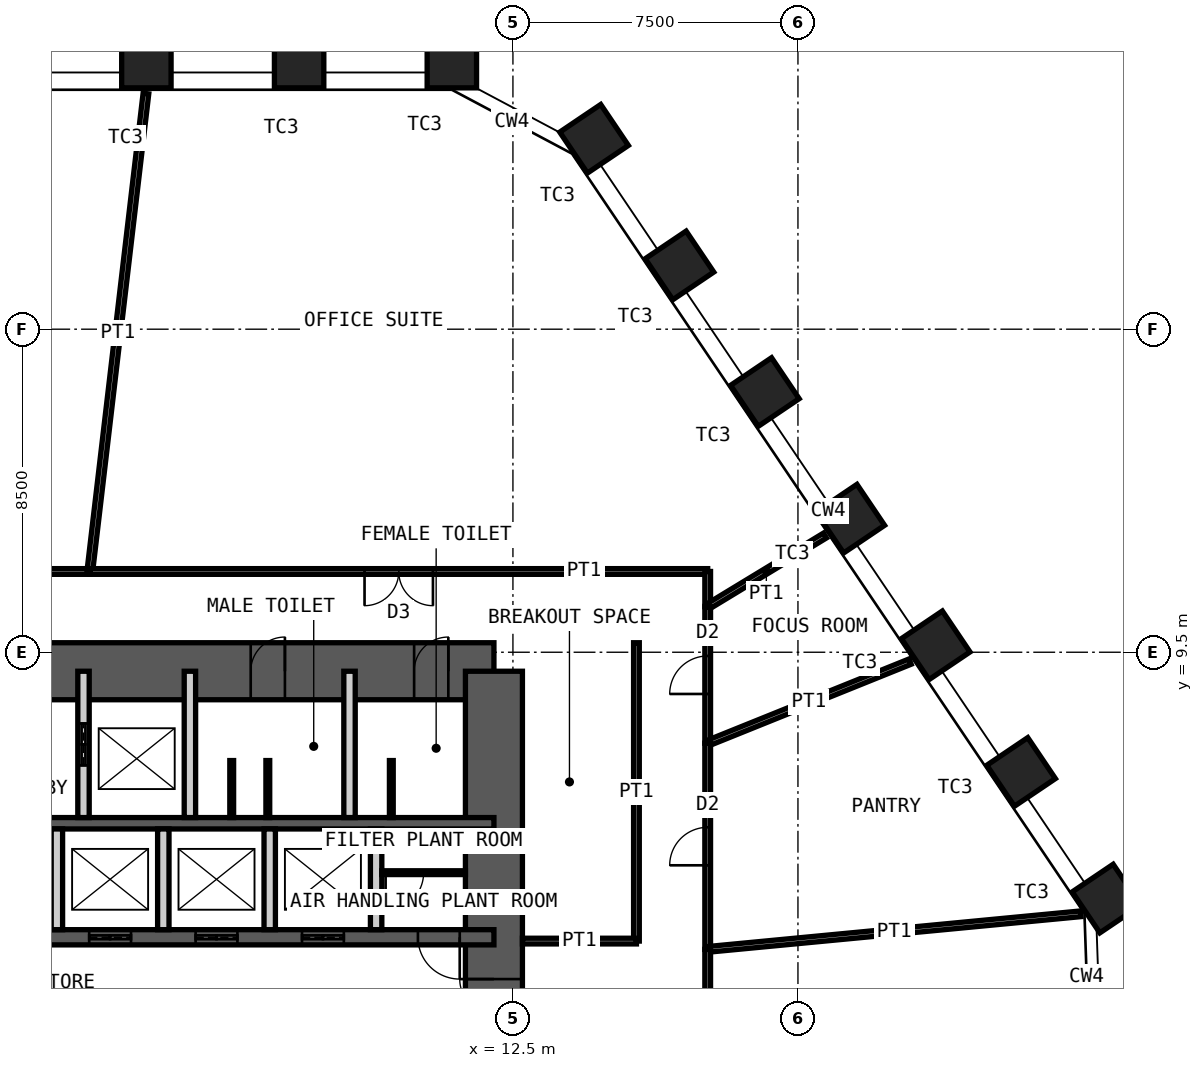
"""IFC4 building model, lengths in metres.
Left out: names, types, materials, properties, quantities, classifications, styles, units other than length and angle.
Written with IfcOpenShell. Run it as: python <this file> out.ifc"""

import sys

from ifc_helpers import new_model, si_unit, direction, frame, frame_2d, origin, origin_2d, place, context, subcontext, project, spatial, rectangle, hollow_rectangle, extrude, element, fill, save


model = new_model("IFC4")
c1 = context("Model", 3, precision=1e-05, world=origin(), true_north=direction((0.0, 1.0)))
c2 = subcontext(c1, "Body", "Model", "MODEL_VIEW")
j1 = project(units=[si_unit("LENGTHUNIT", "METRE"), si_unit("PLANEANGLEUNIT", "RADIAN")], contexts=[c1])
p1 = place(None, origin())
s1 = spatial("IfcSite", under=j1, at=p1, CompositionType="ELEMENT")
p2 = place(p1, origin())
s2 = spatial("IfcBuilding", under=s1, at=p2, CompositionType="ELEMENT")
p3 = place(p2, frame((0.0, 0.0, 128.2)))
s3 = spatial("IfcBuildingStorey", under=s2, at=p3, CompositionType="ELEMENT", Elevation=128.2)
for number, where, z_axis, x_axis in (
    (1, (2.854, 25.0, 0.0), (0.0, 0.0, 1.0), (-1.0, 0.0, 0.0)),
    (2, (6.874, 25.0, 0.0), (0.0, 0.0, 1.0), (-1.0, 0.0, 0.0)),
    (3, (10.893, 25.0, 0.0), (0.0, 0.0, 1.0), (-1.0, 0.0, 0.0)),
    (4, (14.635, 23.01, 0.0), (0.0, 0.0, 1.0), (-0.559, 0.829, 0.0)),
    (5, (16.882, 19.678, 0.0), (0.0, 0.0, 1.0), (-0.559, 0.829, 0.0)),
    (6, (19.13, 16.346, 0.0), (0.0, 0.0, 1.0), (-0.559, 0.829, 0.0)),
    (7, (21.377, 13.014, 0.0), (0.0, 0.0, 1.0), (-0.559, 0.829, 0.0)),
    (8, (23.625, 9.682, 0.0), (0.0, 0.0, 1.0), (-0.559, 0.829, 0.0)),
    (9, (25.872, 6.351, 0.0), (0.0, 0.0, 1.0), (-0.559, 0.829, 0.0)),
    (10, (28.119, 3.019, 0.0), (0.0, 0.0, 1.0), (-0.559, 0.829, 0.0)),
):
    element("IfcColumn", number, at=place(p3, frame(where, z_axis=z_axis, x_axis=x_axis)), inside=s3, PredefinedType="COLUMN", context=c2, shape_type="SweptSolid", body=[
        extrude(hollow_rectangle(XDim=1.3, YDim=1.3, WallThickness=0.1, at=origin_2d()), origin(), (0.0, 0.0, 1.0), 4.2),
    ])
p4 = place(p3, frame((-12.0, 9.0, 0.0), z_axis=(0.0, 0.0, 1.0), x_axis=(1.0, 0.0, 0.0)))
e11 = element("IfcWall", 11, at=p4, inside=s3, PredefinedType="SHEAR", context=c2, shape_type="SweptSolid", body=[
    extrude(rectangle(XDim=24.0, YDim=1.5, at=frame_2d((12.0, 0.0))), origin(), (0.0, 0.0, 1.0), 4.2),
])
p5 = place(p4, frame((10.4, 0.0, 0.0)))
e12 = element("IfcOpeningElement", 12, at=p5, cuts=e11, PredefinedType="OPENING", context=c2, shape_type="SweptSolid", body=[
    extrude(rectangle(XDim=1.0, YDim=2.1, at=frame_2d((0.5, 1.05))), frame((0.0, 0.76, 0.0), z_axis=(0.0, -1.0, 0.0), x_axis=(1.0, 0.0, 0.0)), (0.0, 0.0, 1.0), 1.52),
])
p6 = place(p4, frame((17.6, 0.0, 0.0)))
e13 = element("IfcOpeningElement", 13, at=p6, cuts=e11, PredefinedType="OPENING", context=c2, shape_type="SweptSolid", body=[
    extrude(rectangle(XDim=0.9, YDim=2.1, at=frame_2d((0.45, 1.05))), frame((0.0, 0.76, 0.0), z_axis=(0.0, -1.0, 0.0), x_axis=(1.0, 0.0, 0.0)), (0.0, 0.0, 1.0), 1.52),
])
p7 = place(p4, frame((21.9, 0.0, 0.0)))
e14 = element("IfcOpeningElement", 14, at=p7, cuts=e11, PredefinedType="OPENING", context=c2, shape_type="SweptSolid", body=[
    extrude(rectangle(XDim=0.9, YDim=2.1, at=frame_2d((0.45, 1.05))), frame((0.0, 0.76, 0.0), z_axis=(0.0, -1.0, 0.0), x_axis=(1.0, 0.0, 0.0)), (0.0, 0.0, 1.0), 1.52),
])
p8 = place(p3, frame((12.0, -9.0, 0.0), z_axis=(0.0, 0.0, 1.0), x_axis=(0.0, 1.0, 0.0)))
e15 = element("IfcWall", 15, at=p8, inside=s3, PredefinedType="SHEAR", context=c2, shape_type="SweptSolid", body=[
    extrude(rectangle(XDim=18.0, YDim=1.5, at=frame_2d((9.0, 0.0))), origin(), (0.0, 0.0, 1.0), 4.2),
])
p9 = place(p8, frame((8.1, 0.0, 0.0)))
e16 = element("IfcOpeningElement", 16, at=p9, cuts=e15, PredefinedType="OPENING", context=c2, shape_type="SweptSolid", body=[
    extrude(rectangle(XDim=1.8, YDim=2.1, at=frame_2d((0.9, 1.05))), frame((0.0, 0.76, 0.0), z_axis=(0.0, -1.0, 0.0), x_axis=(1.0, 0.0, 0.0)), (0.0, 0.0, 1.0), 1.52),
])
p10 = place(p3, frame((-12.0, 5.0, 0.0), z_axis=(0.0, 0.0, 1.0), x_axis=(1.0, 0.0, 0.0)))
e17 = element("IfcWall", 17, at=p10, inside=s3, PredefinedType="SHEAR", context=c2, shape_type="SweptSolid", body=[
    extrude(rectangle(XDim=24.0, YDim=0.3, at=frame_2d((12.0, 0.0))), origin(), (0.0, 0.0, 1.0), 4.2),
])
p11 = place(p3, frame((-12.0, 2.0, 0.0), z_axis=(0.0, 0.0, 1.0), x_axis=(1.0, 0.0, 0.0)))
e18 = element("IfcWall", 18, at=p11, inside=s3, PredefinedType="SHEAR", context=c2, shape_type="SweptSolid", body=[
    extrude(rectangle(XDim=24.0, YDim=0.4, at=frame_2d((12.0, 0.0))), origin(), (0.0, 0.0, 1.0), 4.2),
])
p12 = place(p11, frame((2.4, 0.0, 0.0)))
e19 = element("IfcOpeningElement", 19, at=p12, cuts=e18, PredefinedType="OPENING", context=c2, shape_type="SweptSolid", body=[
    extrude(rectangle(XDim=1.1, YDim=2.1, at=frame_2d((0.55, 1.05))), frame((0.0, 0.21, 0.0), z_axis=(0.0, -1.0, 0.0), x_axis=(1.0, 0.0, 0.0)), (0.0, 0.0, 1.0), 0.42),
])
p13 = place(p11, frame((22.0, 0.0, 0.0)))
e20 = element("IfcOpeningElement", 20, at=p13, cuts=e18, PredefinedType="OPENING", context=c2, shape_type="SweptSolid", body=[
    extrude(rectangle(XDim=1.1, YDim=2.1, at=frame_2d((0.55, 1.05))), frame((0.0, 0.21, 0.0), z_axis=(0.0, -1.0, 0.0), x_axis=(1.0, 0.0, 0.0)), (0.0, 0.0, 1.0), 0.42),
])
p14 = place(p11, frame((10.15, 0.0, 0.0)))
e21 = element("IfcOpeningElement", 21, at=p14, cuts=e18, PredefinedType="OPENING", context=c2, shape_type="SweptSolid", body=[
    extrude(rectangle(XDim=1.0, YDim=2.1, at=frame_2d((0.5, 1.05))), frame((0.0, 0.21, 0.0), z_axis=(0.0, -1.0, 0.0), x_axis=(1.0, 0.0, 0.0)), (0.0, 0.0, 1.0), 0.42),
])
p15 = place(p11, frame((6.9, 0.0, 0.0)))
e22 = element("IfcOpeningElement", 22, at=p15, cuts=e18, PredefinedType="OPENING", context=c2, shape_type="SweptSolid", body=[
    extrude(rectangle(XDim=1.0, YDim=2.1, at=frame_2d((0.5, 1.05))), frame((0.0, 0.21, 0.0), z_axis=(0.0, -1.0, 0.0), x_axis=(1.0, 0.0, 0.0)), (0.0, 0.0, 1.0), 0.42),
])
p16 = place(p11, frame((13.35, 0.0, 0.0)))
e23 = element("IfcOpeningElement", 23, at=p16, cuts=e18, PredefinedType="OPENING", context=c2, shape_type="SweptSolid", body=[
    extrude(rectangle(XDim=1.1, YDim=2.4, at=frame_2d((0.55, 1.2))), frame((0.0, 0.21, 0.0), z_axis=(0.0, -1.0, 0.0), x_axis=(1.0, 0.0, 0.0)), (0.0, 0.0, 1.0), 0.42),
])
p17 = place(p11, frame((16.15, 0.0, 0.0)))
e24 = element("IfcOpeningElement", 24, at=p17, cuts=e18, PredefinedType="OPENING", context=c2, shape_type="SweptSolid", body=[
    extrude(rectangle(XDim=1.1, YDim=2.4, at=frame_2d((0.55, 1.2))), frame((0.0, 0.21, 0.0), z_axis=(0.0, -1.0, 0.0), x_axis=(1.0, 0.0, 0.0)), (0.0, 0.0, 1.0), 0.42),
])
p18 = place(p11, frame((18.95, 0.0, 0.0)))
e25 = element("IfcOpeningElement", 25, at=p18, cuts=e18, PredefinedType="OPENING", context=c2, shape_type="SweptSolid", body=[
    extrude(rectangle(XDim=1.1, YDim=2.4, at=frame_2d((0.55, 1.2))), frame((0.0, 0.21, 0.0), z_axis=(0.0, -1.0, 0.0), x_axis=(1.0, 0.0, 0.0)), (0.0, 0.0, 1.0), 0.42),
])
p19 = place(p3, frame((1.2, 5.15, 0.0), z_axis=(0.0, 0.0, 1.0), x_axis=(0.0, 1.0, 0.0)))
e26 = element("IfcWall", 26, at=p19, inside=s3, PredefinedType="PARTITIONING", context=c2, shape_type="SweptSolid", body=[
    extrude(rectangle(XDim=3.85, YDim=0.3, at=frame_2d((1.925, 0.0))), origin(), (0.0, 0.0, 1.0), 3.98),
])
p20 = place(p19, frame((1.375, 0.0, 0.0)))
e27 = element("IfcOpeningElement", 27, at=p20, cuts=e26, PredefinedType="OPENING", context=c2, shape_type="SweptSolid", body=[
    extrude(rectangle(XDim=1.1, YDim=2.4, at=frame_2d((0.55, 1.2))), frame((0.0, 0.16, 0.0), z_axis=(0.0, -1.0, 0.0), x_axis=(1.0, 0.0, 0.0)), (0.0, 0.0, 1.0), 0.32),
])
for number, where, z_axis, x_axis in (
    (28, (4.0, 5.15, 0.0), (0.0, 0.0, 1.0), (0.0, 1.0, 0.0)),
    (29, (8.2, 5.15, 0.0), (0.0, 0.0, 1.0), (0.0, 1.0, 0.0)),
):
    element("IfcWall", number, at=place(p3, frame(where, z_axis=z_axis, x_axis=x_axis)), inside=s3, PredefinedType="PARTITIONING", context=c2, shape_type="SweptSolid", body=[
        extrude(rectangle(XDim=3.85, YDim=0.3, at=frame_2d((1.925, 0.0))), origin(), (0.0, 0.0, 1.0), 3.98),
    ])
for number, where, z_axis, x_axis in (
    (30, (0.5, 2.2, 0.0), (0.0, 0.0, 1.0), (0.0, 1.0, 0.0)),
    (31, (3.3, 2.2, 0.0), (0.0, 0.0, 1.0), (0.0, 1.0, 0.0)),
    (32, (6.1, 2.2, 0.0), (0.0, 0.0, 1.0), (0.0, 1.0, 0.0)),
    (33, (8.9, 2.2, 0.0), (0.0, 0.0, 1.0), (0.0, 1.0, 0.0)),
):
    element("IfcWall", number, at=place(p3, frame(where, z_axis=z_axis, x_axis=x_axis)), inside=s3, PredefinedType="PARTITIONING", context=c2, shape_type="SweptSolid", body=[
        extrude(rectangle(XDim=2.65, YDim=0.3, at=frame_2d((1.325, 0.0))), origin(), (0.0, 0.0, 1.0), 3.98),
    ])
p21 = place(p3, frame((9.05, 3.7, 0.0), z_axis=(0.0, 0.0, 1.0), x_axis=(1.0, 0.0, 0.0)))
e34 = element("IfcWall", 34, at=p21, inside=s3, PredefinedType="PARTITIONING", context=c2, shape_type="SweptSolid", body=[
    extrude(rectangle(XDim=2.2, YDim=0.1, at=frame_2d((1.1, 0.0))), origin(), (0.0, 0.0, 1.0), 3.98),
])
p22 = place(p21, frame((0.1, 0.0, 0.0)))
e35 = element("IfcOpeningElement", 35, at=p22, cuts=e34, PredefinedType="OPENING", context=c2, shape_type="SweptSolid", body=[
    extrude(rectangle(XDim=1.0, YDim=2.4, at=frame_2d((0.5, 1.2))), frame((0.0, 0.06, 0.0), z_axis=(0.0, -1.0, 0.0), x_axis=(1.0, 0.0, 0.0)), (0.0, 0.0, 1.0), 0.12),
])
for number, where, z_axis, x_axis in (
    (36, (5.1, 5.15, 0.0), (0.0, 0.0, 1.0), (0.0, 1.0, 0.0)),
    (37, (6.05, 5.15, 0.0), (0.0, 0.0, 1.0), (0.0, 1.0, 0.0)),
    (38, (9.3, 5.15, 0.0), (0.0, 0.0, 1.0), (0.0, 1.0, 0.0)),
):
    element("IfcWall", number, at=place(p3, frame(where, z_axis=z_axis, x_axis=x_axis)), inside=s3, PredefinedType="PARTITIONING", context=c2, shape_type="SweptSolid", body=[
        extrude(rectangle(XDim=1.5, YDim=0.1, at=frame_2d((0.75, 0.0))), origin(), (0.0, 0.0, 1.0), 2.1),
    ])
p23 = place(p3, frame((-8.277, 11.625, 0.0), z_axis=(0.0, 0.0, 1.0), x_axis=(1.0, 0.0, 0.0)))
e39 = element("IfcWall", 39, at=p23, inside=s3, PredefinedType="PARTITIONING", context=c2, shape_type="SweptSolid", body=[
    extrude(rectangle(XDim=9.642, YDim=0.15, at=frame_2d((4.821, 0.0))), origin(), (0.0, 0.0, 1.0), 4.03),
])
p24 = place(p23, frame((3.921, 0.0, 0.0)))
e40 = element("IfcOpeningElement", 40, at=p24, cuts=e39, PredefinedType="OPENING", context=c2, shape_type="SweptSolid", body=[
    extrude(rectangle(XDim=1.8, YDim=2.4, at=frame_2d((0.9, 1.2))), frame((0.0, 0.085, 0.0), z_axis=(0.0, -1.0, 0.0), x_axis=(1.0, 0.0, 0.0)), (0.0, 0.0, 1.0), 0.17),
])
p25 = place(p3, frame((2.843, 24.201, 0.0), z_axis=(0.0, 0.0, 1.0), x_axis=(-0.116670084723, -0.993170726175, 0.0)))
e41 = element("IfcWall", 41, at=p25, inside=s3, PredefinedType="PARTITIONING", context=c2, shape_type="SweptSolid", body=[
    extrude(rectangle(XDim=12.662, YDim=0.15, at=frame_2d((6.331, 0.0))), origin(), (0.0, 0.0, 1.0), 3.33),
])
p26 = place(p3, frame((1.366, 11.625, 0.0), z_axis=(0.0, 0.0, 1.0), x_axis=(1.0, 0.0, 0.0)))
e42 = element("IfcWall", 42, at=p26, inside=s3, PredefinedType="PARTITIONING", context=c2, shape_type="SweptSolid", body=[
    extrude(rectangle(XDim=16.259, YDim=0.15, at=frame_2d((8.13, 0.0))), origin(), (0.0, 0.0, 1.0), 4.03),
])
p27 = place(p26, frame((7.23, 0.0, 0.0)))
e43 = element("IfcOpeningElement", 43, at=p27, cuts=e42, PredefinedType="OPENING", context=c2, shape_type="SweptSolid", body=[
    extrude(rectangle(XDim=1.8, YDim=2.4, at=frame_2d((0.9, 1.2))), frame((0.0, 0.085, 0.0), z_axis=(0.0, -1.0, 0.0), x_axis=(1.0, 0.0, 0.0)), (0.0, 0.0, 1.0), 0.17),
])
p28 = place(p3, frame((17.625, 11.625, 0.0), z_axis=(0.0, 0.0, 1.0), x_axis=(0.0, -1.0, 0.0)))
e44 = element("IfcWall", 44, at=p28, inside=s3, PredefinedType="PARTITIONING", context=c2, shape_type="SweptSolid", body=[
    extrude(rectangle(XDim=0.927, YDim=0.15, at=frame_2d((0.464, 0.0))), origin(), (0.0, 0.0, 1.0), 4.03),
])
p29 = place(p3, frame((20.711, 12.571, 0.0), z_axis=(0.0, 0.0, 1.0), x_axis=(-0.854862500505, -0.518854608952, 0.0)))
e45 = element("IfcWall", 45, at=p29, inside=s3, PredefinedType="PARTITIONING", context=c2, shape_type="SweptSolid", body=[
    extrude(rectangle(XDim=3.61, YDim=0.15, at=frame_2d((1.805, 0.0))), origin(), (0.0, 0.0, 1.0), 3.33),
])
p30 = place(p3, frame((17.625, 10.698, 0.0), z_axis=(0.0, 0.0, 1.0), x_axis=(0.0, -1.0, 0.0)))
e46 = element("IfcWall", 46, at=p30, inside=s3, PredefinedType="PARTITIONING", context=c2, shape_type="SweptSolid", body=[
    extrude(rectangle(XDim=3.592, YDim=0.15, at=frame_2d((1.796, 0.0))), origin(), (0.0, 0.0, 1.0), 4.03),
])
p31 = place(p30, frame((1.296, 0.0, 0.0)))
e47 = element("IfcOpeningElement", 47, at=p31, cuts=e46, PredefinedType="OPENING", context=c2, shape_type="SweptSolid", body=[
    extrude(rectangle(XDim=1.0, YDim=2.4, at=frame_2d((0.5, 1.2))), frame((0.0, 0.085, 0.0), z_axis=(0.0, -1.0, 0.0), x_axis=(1.0, 0.0, 0.0)), (0.0, 0.0, 1.0), 0.17),
])
p32 = place(p3, frame((22.951, 9.254, 0.0), z_axis=(0.0, 0.0, 1.0), x_axis=(-0.927444087873, -0.373961848147, 0.0)))
e48 = element("IfcWall", 48, at=p32, inside=s3, PredefinedType="PARTITIONING", context=c2, shape_type="SweptSolid", body=[
    extrude(rectangle(XDim=5.743, YDim=0.15, at=frame_2d((2.872, 0.0))), origin(), (0.0, 0.0, 1.0), 3.33),
])
p33 = place(p3, frame((17.625, 7.106, 0.0), z_axis=(0.0, 0.0, 1.0), x_axis=(0.0, -1.0, 0.0)))
e49 = element("IfcWall", 49, at=p33, inside=s3, PredefinedType="PARTITIONING", context=c2, shape_type="SweptSolid", body=[
    extrude(rectangle(XDim=5.425, YDim=0.15, at=frame_2d((2.712, 0.0))), origin(), (0.0, 0.0, 1.0), 4.03),
])
p34 = place(p33, frame((2.212, 0.0, 0.0)))
e50 = element("IfcOpeningElement", 50, at=p34, cuts=e49, PredefinedType="OPENING", context=c2, shape_type="SweptSolid", body=[
    extrude(rectangle(XDim=1.0, YDim=2.4, at=frame_2d((0.5, 1.2))), frame((0.0, 0.085, 0.0), z_axis=(0.0, -1.0, 0.0), x_axis=(1.0, 0.0, 0.0)), (0.0, 0.0, 1.0), 0.17),
])
p35 = place(p3, frame((27.439, 2.618, 0.0), z_axis=(0.0, 0.0, 1.0), x_axis=(-0.995480435234, -0.094966852466, 0.0)))
e51 = element("IfcWall", 51, at=p35, inside=s3, PredefinedType="PARTITIONING", context=c2, shape_type="SweptSolid", body=[
    extrude(rectangle(XDim=9.859, YDim=0.15, at=frame_2d((4.93, 0.0))), origin(), (0.0, 0.0, 1.0), 2.93),
])
p36 = place(p3, frame((17.625, 1.681, 0.0), z_axis=(0.0, 0.0, 1.0), x_axis=(0.0, -1.0, 0.0)))
e52 = element("IfcWall", 52, at=p36, inside=s3, PredefinedType="PARTITIONING", context=c2, shape_type="SweptSolid", body=[
    extrude(rectangle(XDim=7.394, YDim=0.15, at=frame_2d((3.697, 0.0))), origin(), (0.0, 0.0, 1.0), 4.03),
])
p37 = place(p36, frame((3.197, 0.0, 0.0)))
e53 = element("IfcOpeningElement", 53, at=p37, cuts=e52, PredefinedType="OPENING", context=c2, shape_type="SweptSolid", body=[
    extrude(rectangle(XDim=1.0, YDim=2.4, at=frame_2d((0.5, 1.2))), frame((0.0, 0.085, 0.0), z_axis=(0.0, -1.0, 0.0), x_axis=(1.0, 0.0, 0.0)), (0.0, 0.0, 1.0), 0.17),
])
p38 = place(p3, frame((15.75, 1.9, 0.0), z_axis=(0.0, 0.0, 1.0), x_axis=(0.0, 1.0, 0.0)))
e54 = element("IfcWall", 54, at=p38, inside=s3, PredefinedType="PARTITIONING", context=c2, shape_type="SweptSolid", body=[
    extrude(rectangle(XDim=7.85, YDim=0.15, at=frame_2d((3.925, 0.0))), origin(), (0.0, 0.0, 1.0), 4.03),
])
p39 = place(p3, frame((12.75, 1.9, 0.0), z_axis=(0.0, 0.0, 1.0), x_axis=(1.0, 0.0, 0.0)))
e55 = element("IfcWall", 55, at=p39, inside=s3, PredefinedType="PARTITIONING", context=c2, shape_type="SweptSolid", body=[
    extrude(rectangle(XDim=3.0, YDim=0.15, at=frame_2d((1.5, 0.0))), origin(), (0.0, 0.0, 1.0), 2.93),
])
p40 = place(p6, origin())
e56 = element("IfcDoor", 56, at=p40, inside=s3, OperationType="SINGLE_SWING_LEFT", PredefinedType="DOOR", context=c2, shape_type="SweptSolid", body=[
    extrude(rectangle(XDim=0.9, YDim=2.1, at=frame_2d((0.45, 1.05))), frame((0.0, 0.025, 0.0), z_axis=(0.0, -1.0, 0.0), x_axis=(1.0, 0.0, 0.0)), (0.0, 0.0, 1.0), 0.05),
])
fill(e13, e56)
p41 = place(p7, origin())
e57 = element("IfcDoor", 57, at=p41, inside=s3, OperationType="SINGLE_SWING_LEFT", PredefinedType="DOOR", context=c2, shape_type="SweptSolid", body=[
    extrude(rectangle(XDim=0.9, YDim=2.1, at=frame_2d((0.45, 1.05))), frame((0.0, 0.025, 0.0), z_axis=(0.0, -1.0, 0.0), x_axis=(1.0, 0.0, 0.0)), (0.0, 0.0, 1.0), 0.05),
])
fill(e14, e57)
p42 = place(p13, origin())
e58 = element("IfcDoor", 58, at=p42, inside=s3, OperationType="SINGLE_SWING_RIGHT", PredefinedType="DOOR", context=c2, shape_type="SweptSolid", body=[
    extrude(rectangle(XDim=1.1, YDim=2.1, at=frame_2d((0.55, 1.05))), frame((0.0, 0.025, 0.0), z_axis=(0.0, -1.0, 0.0), x_axis=(1.0, 0.0, 0.0)), (0.0, 0.0, 1.0), 0.05),
])
fill(e20, e58)
p43 = place(p9, origin())
e59 = element("IfcDoor", 59, at=p43, inside=s3, OperationType="DOUBLE_DOOR_DOUBLE_SWING", PredefinedType="DOOR", context=c2, shape_type="SweptSolid", body=[
    extrude(rectangle(XDim=1.8, YDim=2.1, at=frame_2d((0.9, 1.05))), frame((0.0, 0.025, 0.0), z_axis=(0.0, -1.0, 0.0), x_axis=(1.0, 0.0, 0.0)), (0.0, 0.0, 1.0), 0.05),
])
fill(e16, e59)
p44 = place(p20, origin())
e60 = element("IfcDoor", 60, at=p44, inside=s3, OperationType="DOUBLE_DOOR_SLIDING", PredefinedType="DOOR", context=c2, shape_type="SweptSolid", body=[
    extrude(rectangle(XDim=1.1, YDim=2.4, at=frame_2d((0.55, 1.2))), frame((0.0, 0.025, 0.0), z_axis=(0.0, -1.0, 0.0), x_axis=(1.0, 0.0, 0.0)), (0.0, 0.0, 1.0), 0.05),
])
fill(e27, e60)
p45 = place(p16, origin())
e61 = element("IfcDoor", 61, at=p45, inside=s3, OperationType="DOUBLE_DOOR_SLIDING", PredefinedType="DOOR", context=c2, shape_type="SweptSolid", body=[
    extrude(rectangle(XDim=1.1, YDim=2.4, at=frame_2d((0.55, 1.2))), frame((0.0, 0.025, 0.0), z_axis=(0.0, -1.0, 0.0), x_axis=(1.0, 0.0, 0.0)), (0.0, 0.0, 1.0), 0.05),
])
fill(e23, e61)
p46 = place(p17, origin())
e62 = element("IfcDoor", 62, at=p46, inside=s3, OperationType="DOUBLE_DOOR_SLIDING", PredefinedType="DOOR", context=c2, shape_type="SweptSolid", body=[
    extrude(rectangle(XDim=1.1, YDim=2.4, at=frame_2d((0.55, 1.2))), frame((0.0, 0.025, 0.0), z_axis=(0.0, -1.0, 0.0), x_axis=(1.0, 0.0, 0.0)), (0.0, 0.0, 1.0), 0.05),
])
fill(e24, e62)
p47 = place(p18, origin())
e63 = element("IfcDoor", 63, at=p47, inside=s3, OperationType="DOUBLE_DOOR_SLIDING", PredefinedType="DOOR", context=c2, shape_type="SweptSolid", body=[
    extrude(rectangle(XDim=1.1, YDim=2.4, at=frame_2d((0.55, 1.2))), frame((0.0, 0.025, 0.0), z_axis=(0.0, -1.0, 0.0), x_axis=(1.0, 0.0, 0.0)), (0.0, 0.0, 1.0), 0.05),
])
fill(e25, e63)
p48 = place(p22, origin())
e64 = element("IfcDoor", 64, at=p48, inside=s3, OperationType="SINGLE_SWING_LEFT", PredefinedType="DOOR", context=c2, shape_type="SweptSolid", body=[
    extrude(rectangle(XDim=1.0, YDim=2.4, at=frame_2d((0.5, 1.2))), frame((0.0, 0.025, 0.0), z_axis=(0.0, -1.0, 0.0), x_axis=(1.0, 0.0, 0.0)), (0.0, 0.0, 1.0), 0.05),
])
fill(e35, e64)
p49 = place(p27, origin())
e65 = element("IfcDoor", 65, at=p49, inside=s3, OperationType="DOUBLE_DOOR_DOUBLE_SWING", PredefinedType="DOOR", context=c2, shape_type="SweptSolid", body=[
    extrude(rectangle(XDim=1.8, YDim=2.4, at=frame_2d((0.9, 1.2))), frame((0.0, 0.025, 0.0), z_axis=(0.0, -1.0, 0.0), x_axis=(1.0, 0.0, 0.0)), (0.0, 0.0, 1.0), 0.05),
])
fill(e43, e65)
p50 = place(p31, origin())
e66 = element("IfcDoor", 66, at=p50, inside=s3, OperationType="SINGLE_SWING_RIGHT", PredefinedType="DOOR", context=c2, shape_type="SweptSolid", body=[
    extrude(rectangle(XDim=1.0, YDim=2.4, at=frame_2d((0.5, 1.2))), frame((0.0, 0.025, 0.0), z_axis=(0.0, -1.0, 0.0), x_axis=(1.0, 0.0, 0.0)), (0.0, 0.0, 1.0), 0.05),
])
fill(e47, e66)
p51 = place(p34, origin())
e67 = element("IfcDoor", 67, at=p51, inside=s3, OperationType="SINGLE_SWING_RIGHT", PredefinedType="DOOR", context=c2, shape_type="SweptSolid", body=[
    extrude(rectangle(XDim=1.0, YDim=2.4, at=frame_2d((0.5, 1.2))), frame((0.0, 0.025, 0.0), z_axis=(0.0, -1.0, 0.0), x_axis=(1.0, 0.0, 0.0)), (0.0, 0.0, 1.0), 0.05),
])
fill(e50, e67)
save(model, sys.argv[1])
